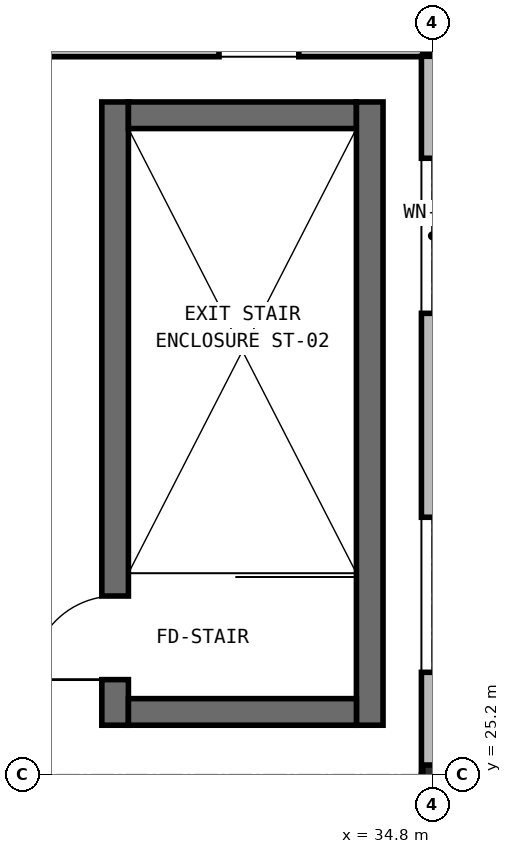
"""IFC4 building model, lengths in metres.
Left out: names, types, materials, properties, quantities, classifications, styles, units other than length and angle.
Written with IfcOpenShell. Run it as: python <this file> out.ifc"""

import sys

from ifc_helpers import new_model, si_unit, direction, frame, frame_2d, origin, origin_2d, place, context, subcontext, project, spatial, rectangle, i_section, extrude, element, fill, save


model = new_model("IFC4")
c1 = context("Model", 3, precision=1e-05, world=origin(), true_north=direction((0.0, 1.0)))
c2 = subcontext(c1, "Body", "Model", "MODEL_VIEW")
j1 = project(units=[si_unit("LENGTHUNIT", "METRE"), si_unit("PLANEANGLEUNIT", "RADIAN")], contexts=[c1])
p1 = place(None, origin())
s1 = spatial("IfcSite", under=j1, at=p1, CompositionType="ELEMENT")
p2 = place(p1, origin())
s2 = spatial("IfcBuilding", under=s1, at=p2, CompositionType="ELEMENT")
p3 = place(p2, frame((0.0, 0.0, 9.8)))
s3 = spatial("IfcBuildingStorey", under=s2, at=p3, CompositionType="ELEMENT", Elevation=9.8)
p4 = place(p3, frame((30.625, 25.85, 0.0), z_axis=(0.0, 0.0, 1.0), x_axis=(0.0, 1.0, 0.0)))
e1 = element("IfcWall", 1, at=p4, inside=s3, PredefinedType="SHEAR", context=c2, shape_type="SweptSolid", body=[
    extrude(rectangle(XDim=8.2, YDim=0.35, at=frame_2d((4.1, 0.0))), origin(), (0.0, 0.0, 1.0), 4.35),
])
p5 = place(p4, frame((0.6, 0.0, 0.0)))
e2 = element("IfcOpeningElement", 2, at=p5, cuts=e1, PredefinedType="OPENING", context=c2, shape_type="SweptSolid", body=[
    extrude(rectangle(XDim=1.1, YDim=2.15, at=frame_2d((0.55, 1.075))), frame((0.0, 0.185, 0.0), z_axis=(0.0, -1.0, 0.0), x_axis=(1.0, 0.0, 0.0)), (0.0, 0.0, 1.0), 0.37),
])
p6 = place(p3, frame((30.8, 33.875, 0.0), z_axis=(0.0, 0.0, 1.0), x_axis=(1.0, 0.0, 0.0)))
e3 = element("IfcWall", 3, at=p6, inside=s3, PredefinedType="SHEAR", context=c2, shape_type="SweptSolid", body=[
    extrude(rectangle(XDim=3.0, YDim=0.35, at=frame_2d((1.5, 0.0))), origin(), (0.0, 0.0, 1.0), 4.35),
])
p7 = place(p3, frame((33.975, 34.05, 0.0), z_axis=(0.0, 0.0, 1.0), x_axis=(0.0, -1.0, 0.0)))
e4 = element("IfcWall", 4, at=p7, inside=s3, PredefinedType="SHEAR", context=c2, shape_type="SweptSolid", body=[
    extrude(rectangle(XDim=8.2, YDim=0.35, at=frame_2d((4.1, 0.0))), origin(), (0.0, 0.0, 1.0), 4.35),
])
p8 = place(p3, frame((33.8, 26.025, 0.0), z_axis=(0.0, 0.0, 1.0), x_axis=(-1.0, 0.0, 0.0)))
e5 = element("IfcWall", 5, at=p8, inside=s3, PredefinedType="SHEAR", context=c2, shape_type="SweptSolid", body=[
    extrude(rectangle(XDim=3.0, YDim=0.35, at=frame_2d((1.5, 0.0))), origin(), (0.0, 0.0, 1.0), 4.35),
])
for number, where, z_axis, x_axis in (
    (6, (34.8, 25.2, 0.0), (0.0, 0.0, 1.0), (1.0, 0.0, 0.0)),
    (7, (34.8, 34.8, 0.0), (0.0, 0.0, 1.0), (1.0, 0.0, 0.0)),
):
    element("IfcColumn", number, at=place(p3, frame(where, z_axis=z_axis, x_axis=x_axis)), inside=s3, PredefinedType="COLUMN", context=c2, shape_type="SweptSolid", body=[
        extrude(i_section(OverallWidth=0.254, OverallDepth=0.253, WebThickness=0.009, FlangeThickness=0.014, at=origin_2d()), origin(), (0.0, 0.0, 1.0), 4.55),
    ])
p9 = place(p3, frame((25.204, 34.8, 0.0), z_axis=(0.0, 0.0, 1.0), x_axis=(1.0, 0.0, 0.0)))
e8 = element("IfcWall", 8, at=p9, inside=s3, PredefinedType="SOLIDWALL", context=c2, shape_type="SweptSolid", body=[
    extrude(rectangle(XDim=9.751, YDim=0.31, at=frame_2d((4.875, 0.0))), origin(), (0.0, 0.0, 1.0), 4.064),
])
p10 = place(p9, frame((6.788, 0.0, 0.95)))
e9 = element("IfcOpeningElement", 9, at=p10, cuts=e8, PredefinedType="OPENING", context=c2, shape_type="SweptSolid", body=[
    extrude(rectangle(XDim=1.05, YDim=1.8, at=frame_2d((0.525, 0.9))), frame((0.0, 0.165, 0.0), z_axis=(0.0, -1.0, 0.0), x_axis=(1.0, 0.0, 0.0)), (0.0, 0.0, 1.0), 0.33),
])
p11 = place(p3, frame((34.8, 34.651, 0.0), z_axis=(0.0, 0.0, 1.0), x_axis=(0.0, -1.0, 0.0)))
e10 = element("IfcWall", 10, at=p11, inside=s3, PredefinedType="SOLIDWALL", context=c2, shape_type="SweptSolid", body=[
    extrude(rectangle(XDim=9.447, YDim=0.29, at=frame_2d((4.723, 0.0))), origin(), (0.0, 0.0, 1.0), 4.064),
])
p12 = place(p11, frame((1.342, 0.0, 0.95)))
e11 = element("IfcOpeningElement", 11, at=p12, cuts=e10, PredefinedType="OPENING", context=c2, shape_type="SweptSolid", body=[
    extrude(rectangle(XDim=2.04, YDim=1.56, at=frame_2d((1.02, 0.78))), frame((0.0, 0.155, 0.0), z_axis=(0.0, -1.0, 0.0), x_axis=(1.0, 0.0, 0.0)), (0.0, 0.0, 1.0), 0.31),
])
p13 = place(p11, frame((6.065, 0.0, 0.95)))
e12 = element("IfcOpeningElement", 12, at=p13, cuts=e10, PredefinedType="OPENING", context=c2, shape_type="SweptSolid", body=[
    extrude(rectangle(XDim=2.04, YDim=1.56, at=frame_2d((1.02, 0.78))), frame((0.0, 0.155, 0.0), z_axis=(0.0, -1.0, 0.0), x_axis=(1.0, 0.0, 0.0)), (0.0, 0.0, 1.0), 0.31),
])
p14 = place(p12, origin())
e13 = element("IfcWindow", 13, at=p14, inside=s3, PartitioningType="SINGLE_PANEL", PredefinedType="WINDOW", context=c2, shape_type="SweptSolid", body=[
    extrude(rectangle(XDim=2.04, YDim=1.56, at=frame_2d((1.02, 0.78))), frame((0.0, 0.03, 0.0), z_axis=(0.0, -1.0, 0.0), x_axis=(1.0, 0.0, 0.0)), (0.0, 0.0, 1.0), 0.06),
])
fill(e11, e13)
p15 = place(p13, origin())
e14 = element("IfcWindow", 14, at=p15, inside=s3, PartitioningType="SINGLE_PANEL", PredefinedType="WINDOW", context=c2, shape_type="SweptSolid", body=[
    extrude(rectangle(XDim=2.04, YDim=1.56, at=frame_2d((1.02, 0.78))), frame((0.0, 0.03, 0.0), z_axis=(0.0, -1.0, 0.0), x_axis=(1.0, 0.0, 0.0)), (0.0, 0.0, 1.0), 0.06),
])
fill(e12, e14)
p16 = place(p5, origin())
e15 = element("IfcDoor", 15, at=p16, inside=s3, OperationType="SINGLE_SWING_LEFT", PredefinedType="DOOR", context=c2, shape_type="SweptSolid", body=[
    extrude(rectangle(XDim=1.1, YDim=2.15, at=frame_2d((0.55, 1.075))), frame((0.0, 0.025, 0.0), z_axis=(0.0, -1.0, 0.0), x_axis=(1.0, 0.0, 0.0)), (0.0, 0.0, 1.0), 0.05),
])
fill(e2, e15)
save(model, sys.argv[1])
